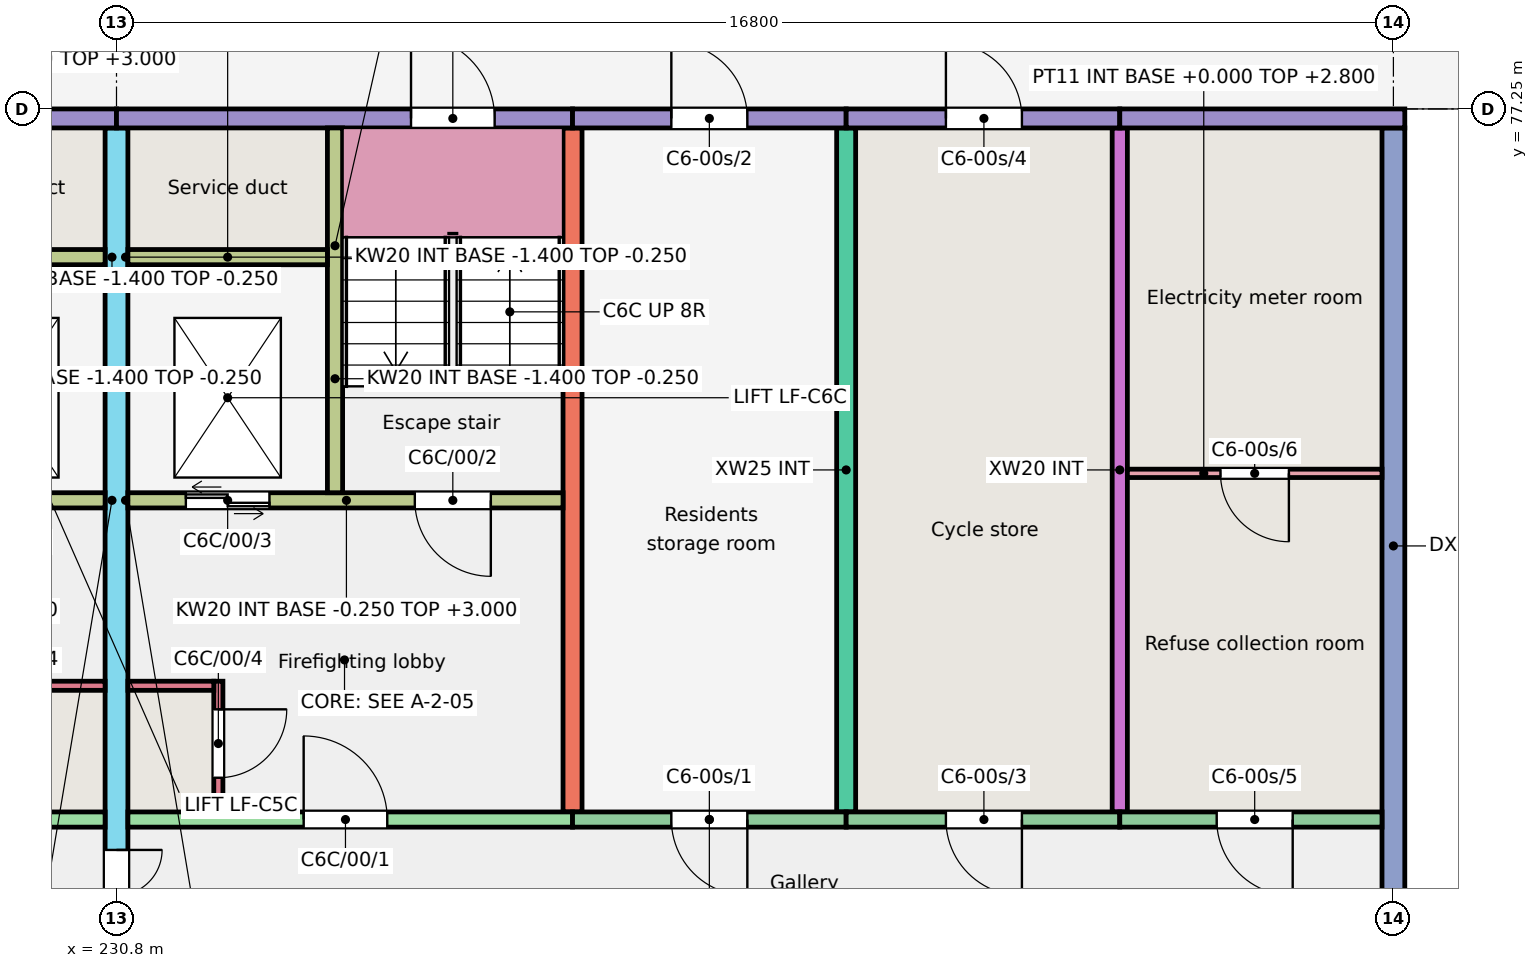
"""IFC4 building model, lengths in metres.
Left out: names, types, materials, properties, quantities, classifications, styles, units other than length and angle.
Written with IfcOpenShell. Run it as: python <this file> out.ifc"""

import sys

from ifc_helpers import new_model, si_unit, direction, frame, frame_2d, origin, place, context, subcontext, project, spatial, rectangle, extrude, element, fill, save


model = new_model("IFC4")
c1 = context("Model", 3, precision=1e-05, world=origin(), true_north=direction((0.0, 1.0)))
c2 = subcontext(c1, "Body", "Model", "MODEL_VIEW")
j1 = project(units=[si_unit("LENGTHUNIT", "METRE"), si_unit("PLANEANGLEUNIT", "RADIAN")], contexts=[c1])
p1 = place(None, origin())
s1 = spatial("IfcSite", under=j1, at=p1, CompositionType="ELEMENT")
p2 = place(p1, origin())
s2 = spatial("IfcBuilding", under=s1, at=p2, CompositionType="ELEMENT")
p3 = place(p2, origin())
s3 = spatial("IfcBuildingStorey", under=s2, at=p3, CompositionType="ELEMENT", Elevation=0.0)
p4 = place(p3, frame((230.8, 66.0, -0.25), z_axis=(0.0, 0.0, 1.0), x_axis=(0.0, 1.0, 0.0)))
e1 = element("IfcWall", 1, at=p4, inside=s3, PredefinedType="SHEAR", context=c2, shape_type="SweptSolid", body=[
    extrude(rectangle(XDim=11.0, YDim=0.3, at=frame_2d((5.5, 0.0))), origin(), (0.0, 0.0, 1.0), 3.25),
])
p5 = place(p4, frame((0.3, 0.0, 0.25)))
e2 = element("IfcOpeningElement", 2, at=p5, cuts=e1, PredefinedType="OPENING", context=c2, shape_type="SweptSolid", body=[
    extrude(rectangle(XDim=1.2, YDim=2.1, at=frame_2d((0.6, 1.05))), frame((0.0, 0.16, 0.0), z_axis=(0.0, -1.0, 0.0), x_axis=(1.0, 0.0, 0.0)), (0.0, 0.0, 1.0), 0.32),
])
for number, where, z_axis, x_axis in (
    (3, (236.8, 68.0, -0.25), (0.0, 0.0, 1.0), (0.0, 1.0, 0.0)),
    (4, (240.4, 68.0, -0.25), (0.0, 0.0, 1.0), (0.0, 1.0, 0.0)),
):
    element("IfcWall", number, at=place(p3, frame(where, z_axis=z_axis, x_axis=x_axis)), inside=s3, PredefinedType="SHEAR", context=c2, shape_type="SweptSolid", body=[
        extrude(rectangle(XDim=9.0, YDim=0.25, at=frame_2d((4.5, 0.0))), origin(), (0.0, 0.0, 1.0), 3.25),
    ])
p6 = place(p3, frame((244.0, 68.0, -0.25), z_axis=(0.0, 0.0, 1.0), x_axis=(0.0, 1.0, 0.0)))
e5 = element("IfcWall", 5, at=p6, inside=s3, PredefinedType="SHEAR", context=c2, shape_type="SweptSolid", body=[
    extrude(rectangle(XDim=9.0, YDim=0.2, at=frame_2d((4.5, 0.0))), origin(), (0.0, 0.0, 1.0), 3.25),
])
p7 = place(p3, frame((247.6, 66.0, -0.25), z_axis=(0.0, 0.0, 1.0), x_axis=(0.0, 1.0, 0.0)))
e6 = element("IfcWall", 6, at=p7, inside=s3, PredefinedType="SHEAR", context=c2, shape_type="SweptSolid", body=[
    extrude(rectangle(XDim=11.0, YDim=0.3, at=frame_2d((5.5, 0.0))), origin(), (0.0, 0.0, 1.0), 3.25),
])
p8 = place(p3, frame((224.8, 77.125, -0.25), z_axis=(0.0, 0.0, 1.0), x_axis=(1.0, 0.0, 0.0)))
e7 = element("IfcWall", 7, at=p8, inside=s3, PredefinedType="SOLIDWALL", context=c2, shape_type="SweptSolid", body=[
    extrude(rectangle(XDim=6.0, YDim=0.25, at=frame_2d((3.0, 0.0))), origin(), (0.0, 0.0, 1.0), 3.25),
])
p9 = place(p8, frame((1.025, 0.0, 0.25)))
e8 = element("IfcOpeningElement", 8, at=p9, cuts=e7, PredefinedType="OPENING", context=c2, shape_type="SweptSolid", body=[
    extrude(rectangle(XDim=1.1, YDim=2.1, at=frame_2d((0.55, 1.05))), frame((0.0, 0.135, 0.0), z_axis=(0.0, -1.0, 0.0), x_axis=(1.0, 0.0, 0.0)), (0.0, 0.0, 1.0), 0.27),
])
p10 = place(p3, frame((224.8, 67.9, -0.25), z_axis=(0.0, 0.0, 1.0), x_axis=(1.0, 0.0, 0.0)))
e9 = element("IfcWall", 9, at=p10, inside=s3, PredefinedType="SHEAR", context=c2, shape_type="SweptSolid", body=[
    extrude(rectangle(XDim=5.85, YDim=0.2, at=frame_2d((2.925, 0.0))), origin(), (0.0, 0.0, 1.0), 3.25),
])
p11 = place(p10, frame((2.438, 0.0, 0.25)))
e10 = element("IfcOpeningElement", 10, at=p11, cuts=e9, PredefinedType="OPENING", context=c2, shape_type="SweptSolid", body=[
    extrude(rectangle(XDim=1.1, YDim=2.1, at=frame_2d((0.55, 1.05))), frame((0.0, 0.11, 0.0), z_axis=(0.0, -1.0, 0.0), x_axis=(1.0, 0.0, 0.0)), (0.0, 0.0, 1.0), 0.22),
])
p12 = place(p3, frame((224.925, 72.1, -0.25), z_axis=(0.0, 0.0, 1.0), x_axis=(1.0, 0.0, 0.0)))
e11 = element("IfcWall", 11, at=p12, inside=s3, PredefinedType="SHEAR", context=c2, shape_type="SweptSolid", body=[
    extrude(rectangle(XDim=5.725, YDim=0.2, at=frame_2d((2.862, 0.0))), origin(), (0.0, 0.0, 1.0), 3.25),
])
p13 = place(p12, frame((0.95, 0.0, 0.25)))
e12 = element("IfcOpeningElement", 12, at=p13, cuts=e11, PredefinedType="OPENING", context=c2, shape_type="SweptSolid", body=[
    extrude(rectangle(XDim=1.0, YDim=2.1, at=frame_2d((0.5, 1.05))), frame((0.0, 0.11, 0.0), z_axis=(0.0, -1.0, 0.0), x_axis=(1.0, 0.0, 0.0)), (0.0, 0.0, 1.0), 0.22),
])
p14 = place(p12, frame((3.863, 0.0, 0.25)))
e13 = element("IfcOpeningElement", 13, at=p14, cuts=e11, PredefinedType="OPENING", context=c2, shape_type="SweptSolid", body=[
    extrude(rectangle(XDim=1.1, YDim=2.1, at=frame_2d((0.55, 1.05))), frame((0.0, 0.11, 0.0), z_axis=(0.0, -1.0, 0.0), x_axis=(1.0, 0.0, 0.0)), (0.0, 0.0, 1.0), 0.22),
])
p15 = place(p3, frame((228.025, 75.3, -0.25), z_axis=(0.0, 0.0, 1.0), x_axis=(1.0, 0.0, 0.0)))
e14 = element("IfcWall", 14, at=p15, inside=s3, PredefinedType="SHEAR", context=c2, shape_type="SweptSolid", body=[
    extrude(rectangle(XDim=2.625, YDim=0.2, at=frame_2d((1.312, 0.0))), origin(), (0.0, 0.0, 1.0), 3.25),
])
p16 = place(p3, frame((229.52, 69.66, -0.25), z_axis=(0.0, 0.0, 1.0), x_axis=(1.0, 0.0, 0.0)))
e15 = element("IfcWall", 15, at=p16, inside=s3, PredefinedType="SHEAR", context=c2, shape_type="SweptSolid", body=[
    extrude(rectangle(XDim=1.13, YDim=0.12, at=frame_2d((0.565, 0.0))), origin(), (0.0, 0.0, 1.0), 3.25),
])
p17 = place(p3, frame((230.8, 77.125, -0.25), z_axis=(0.0, 0.0, 1.0), x_axis=(1.0, 0.0, 0.0)))
e16 = element("IfcWall", 16, at=p17, inside=s3, PredefinedType="SOLIDWALL", context=c2, shape_type="SweptSolid", body=[
    extrude(rectangle(XDim=6.0, YDim=0.25, at=frame_2d((3.0, 0.0))), origin(), (0.0, 0.0, 1.0), 3.25),
])
p18 = place(p17, frame((3.875, 0.0, 0.25)))
e17 = element("IfcOpeningElement", 17, at=p18, cuts=e16, PredefinedType="OPENING", context=c2, shape_type="SweptSolid", body=[
    extrude(rectangle(XDim=1.1, YDim=2.1, at=frame_2d((0.55, 1.05))), frame((0.0, 0.135, 0.0), z_axis=(0.0, -1.0, 0.0), x_axis=(1.0, 0.0, 0.0)), (0.0, 0.0, 1.0), 0.27),
])
p19 = place(p3, frame((230.95, 67.9, -0.25), z_axis=(0.0, 0.0, 1.0), x_axis=(1.0, 0.0, 0.0)))
e18 = element("IfcWall", 18, at=p19, inside=s3, PredefinedType="SHEAR", context=c2, shape_type="SweptSolid", body=[
    extrude(rectangle(XDim=5.85, YDim=0.2, at=frame_2d((2.925, 0.0))), origin(), (0.0, 0.0, 1.0), 3.25),
])
p20 = place(p19, frame((2.312, 0.0, 0.25)))
e19 = element("IfcOpeningElement", 19, at=p20, cuts=e18, PredefinedType="OPENING", context=c2, shape_type="SweptSolid", body=[
    extrude(rectangle(XDim=1.1, YDim=2.1, at=frame_2d((0.55, 1.05))), frame((0.0, 0.11, 0.0), z_axis=(0.0, -1.0, 0.0), x_axis=(1.0, 0.0, 0.0)), (0.0, 0.0, 1.0), 0.22),
])
p21 = place(p3, frame((230.95, 72.1, -0.25), z_axis=(0.0, 0.0, 1.0), x_axis=(1.0, 0.0, 0.0)))
e20 = element("IfcWall", 20, at=p21, inside=s3, PredefinedType="SHEAR", context=c2, shape_type="SweptSolid", body=[
    extrude(rectangle(XDim=5.725, YDim=0.2, at=frame_2d((2.863, 0.0))), origin(), (0.0, 0.0, 1.0), 3.25),
])
p22 = place(p21, frame((3.775, 0.0, 0.25)))
e21 = element("IfcOpeningElement", 21, at=p22, cuts=e20, PredefinedType="OPENING", context=c2, shape_type="SweptSolid", body=[
    extrude(rectangle(XDim=1.0, YDim=2.1, at=frame_2d((0.5, 1.05))), frame((0.0, 0.11, 0.0), z_axis=(0.0, -1.0, 0.0), x_axis=(1.0, 0.0, 0.0)), (0.0, 0.0, 1.0), 0.22),
])
p23 = place(p21, frame((0.762, 0.0, 0.25)))
e22 = element("IfcOpeningElement", 22, at=p23, cuts=e20, PredefinedType="OPENING", context=c2, shape_type="SweptSolid", body=[
    extrude(rectangle(XDim=1.1, YDim=2.1, at=frame_2d((0.55, 1.05))), frame((0.0, 0.11, 0.0), z_axis=(0.0, -1.0, 0.0), x_axis=(1.0, 0.0, 0.0)), (0.0, 0.0, 1.0), 0.22),
])
p24 = place(p3, frame((233.675, 72.2, -0.25), z_axis=(0.0, 0.0, 1.0), x_axis=(0.0, 1.0, 0.0)))
e23 = element("IfcWall", 23, at=p24, inside=s3, PredefinedType="SHEAR", context=c2, shape_type="SweptSolid", body=[
    extrude(rectangle(XDim=4.8, YDim=0.2, at=frame_2d((2.4, 0.0))), origin(), (0.0, 0.0, 1.0), 3.25),
])
p25 = place(p3, frame((230.95, 75.3, -0.25), z_axis=(0.0, 0.0, 1.0), x_axis=(1.0, 0.0, 0.0)))
e24 = element("IfcWall", 24, at=p25, inside=s3, PredefinedType="SHEAR", context=c2, shape_type="SweptSolid", body=[
    extrude(rectangle(XDim=2.625, YDim=0.2, at=frame_2d((1.312, 0.0))), origin(), (0.0, 0.0, 1.0), 3.25),
])
p26 = place(p3, frame((232.14, 68.0, -0.25), z_axis=(0.0, 0.0, 1.0), x_axis=(0.0, 1.0, 0.0)))
e25 = element("IfcWall", 25, at=p26, inside=s3, PredefinedType="SHEAR", context=c2, shape_type="SweptSolid", body=[
    extrude(rectangle(XDim=1.72, YDim=0.12, at=frame_2d((0.86, 0.0))), origin(), (0.0, 0.0, 1.0), 3.25),
])
p27 = place(p26, frame((0.45, 0.0, 0.25)))
e26 = element("IfcOpeningElement", 26, at=p27, cuts=e25, PredefinedType="OPENING", context=c2, shape_type="SweptSolid", body=[
    extrude(rectangle(XDim=0.9, YDim=2.1, at=frame_2d((0.45, 1.05))), frame((0.0, 0.07, 0.0), z_axis=(0.0, -1.0, 0.0), x_axis=(1.0, 0.0, 0.0)), (0.0, 0.0, 1.0), 0.14),
])
p28 = place(p3, frame((230.95, 69.66, -0.25), z_axis=(0.0, 0.0, 1.0), x_axis=(1.0, 0.0, 0.0)))
e27 = element("IfcWall", 27, at=p28, inside=s3, PredefinedType="SHEAR", context=c2, shape_type="SweptSolid", body=[
    extrude(rectangle(XDim=1.13, YDim=0.12, at=frame_2d((0.565, 0.0))), origin(), (0.0, 0.0, 1.0), 3.25),
])
p29 = place(p3, frame((236.8, 77.125, -0.25), z_axis=(0.0, 0.0, 1.0), x_axis=(1.0, 0.0, 0.0)))
e28 = element("IfcWall", 28, at=p29, inside=s3, PredefinedType="SOLIDWALL", context=c2, shape_type="SweptSolid", body=[
    extrude(rectangle(XDim=3.6, YDim=0.25, at=frame_2d((1.8, 0.0))), origin(), (0.0, 0.0, 1.0), 3.25),
])
p30 = place(p29, frame((1.3, 0.0, 0.25)))
e29 = element("IfcOpeningElement", 29, at=p30, cuts=e28, PredefinedType="OPENING", context=c2, shape_type="SweptSolid", body=[
    extrude(rectangle(XDim=1.0, YDim=2.1, at=frame_2d((0.5, 1.05))), frame((0.0, 0.135, 0.0), z_axis=(0.0, -1.0, 0.0), x_axis=(1.0, 0.0, 0.0)), (0.0, 0.0, 1.0), 0.27),
])
p31 = place(p3, frame((236.8, 67.9, -0.25), z_axis=(0.0, 0.0, 1.0), x_axis=(1.0, 0.0, 0.0)))
e30 = element("IfcWall", 30, at=p31, inside=s3, PredefinedType="SOLIDWALL", context=c2, shape_type="SweptSolid", body=[
    extrude(rectangle(XDim=3.6, YDim=0.2, at=frame_2d((1.8, 0.0))), origin(), (0.0, 0.0, 1.0), 3.25),
])
p32 = place(p31, frame((1.3, 0.0, 0.25)))
e31 = element("IfcOpeningElement", 31, at=p32, cuts=e30, PredefinedType="OPENING", context=c2, shape_type="SweptSolid", body=[
    extrude(rectangle(XDim=1.0, YDim=2.1, at=frame_2d((0.5, 1.05))), frame((0.0, 0.11, 0.0), z_axis=(0.0, -1.0, 0.0), x_axis=(1.0, 0.0, 0.0)), (0.0, 0.0, 1.0), 0.22),
])
p33 = place(p3, frame((240.4, 77.125, -0.25), z_axis=(0.0, 0.0, 1.0), x_axis=(1.0, 0.0, 0.0)))
e32 = element("IfcWall", 32, at=p33, inside=s3, PredefinedType="SOLIDWALL", context=c2, shape_type="SweptSolid", body=[
    extrude(rectangle(XDim=3.6, YDim=0.25, at=frame_2d((1.8, 0.0))), origin(), (0.0, 0.0, 1.0), 3.25),
])
p34 = place(p33, frame((1.312, 0.0, 0.25)))
e33 = element("IfcOpeningElement", 33, at=p34, cuts=e32, PredefinedType="OPENING", context=c2, shape_type="SweptSolid", body=[
    extrude(rectangle(XDim=1.0, YDim=2.1, at=frame_2d((0.5, 1.05))), frame((0.0, 0.135, 0.0), z_axis=(0.0, -1.0, 0.0), x_axis=(1.0, 0.0, 0.0)), (0.0, 0.0, 1.0), 0.27),
])
p35 = place(p3, frame((240.4, 67.9, -0.25), z_axis=(0.0, 0.0, 1.0), x_axis=(1.0, 0.0, 0.0)))
e34 = element("IfcWall", 34, at=p35, inside=s3, PredefinedType="SOLIDWALL", context=c2, shape_type="SweptSolid", body=[
    extrude(rectangle(XDim=3.6, YDim=0.2, at=frame_2d((1.8, 0.0))), origin(), (0.0, 0.0, 1.0), 3.25),
])
p36 = place(p35, frame((1.312, 0.0, 0.25)))
e35 = element("IfcOpeningElement", 35, at=p36, cuts=e34, PredefinedType="OPENING", context=c2, shape_type="SweptSolid", body=[
    extrude(rectangle(XDim=1.0, YDim=2.1, at=frame_2d((0.5, 1.05))), frame((0.0, 0.11, 0.0), z_axis=(0.0, -1.0, 0.0), x_axis=(1.0, 0.0, 0.0)), (0.0, 0.0, 1.0), 0.22),
])
p37 = place(p3, frame((244.0, 77.125, -0.25), z_axis=(0.0, 0.0, 1.0), x_axis=(1.0, 0.0, 0.0)))
e36 = element("IfcWall", 36, at=p37, inside=s3, PredefinedType="SOLIDWALL", context=c2, shape_type="SweptSolid", body=[
    extrude(rectangle(XDim=3.75, YDim=0.25, at=frame_2d((1.875, 0.0))), origin(), (0.0, 0.0, 1.0), 3.25),
])
p38 = place(p3, frame((244.0, 67.9, -0.25), z_axis=(0.0, 0.0, 1.0), x_axis=(1.0, 0.0, 0.0)))
e37 = element("IfcWall", 37, at=p38, inside=s3, PredefinedType="SOLIDWALL", context=c2, shape_type="SweptSolid", body=[
    extrude(rectangle(XDim=3.45, YDim=0.2, at=frame_2d((1.725, 0.0))), origin(), (0.0, 0.0, 1.0), 3.25),
])
p39 = place(p38, frame((1.275, 0.0, 0.25)))
e38 = element("IfcOpeningElement", 38, at=p39, cuts=e37, PredefinedType="OPENING", context=c2, shape_type="SweptSolid", body=[
    extrude(rectangle(XDim=1.0, YDim=2.1, at=frame_2d((0.5, 1.05))), frame((0.0, 0.11, 0.0), z_axis=(0.0, -1.0, 0.0), x_axis=(1.0, 0.0, 0.0)), (0.0, 0.0, 1.0), 0.22),
])
for number, where, z_axis, x_axis in (
    (39, (227.825, 72.1, -1.4), (0.0, 0.0, 1.0), (1.0, 0.0, 0.0)),
    (40, (227.825, 75.3, -1.4), (0.0, 0.0, 1.0), (1.0, 0.0, 0.0)),
):
    element("IfcWall", number, at=place(p3, frame(where, z_axis=z_axis, x_axis=x_axis)), inside=s3, PredefinedType="SHEAR", context=c2, shape_type="SweptSolid", body=[
        extrude(rectangle(XDim=2.975, YDim=0.2, at=frame_2d((1.488, 0.0))), origin(), (0.0, 0.0, 1.0), 1.15),
    ])
p40 = place(p3, frame((230.725, 72.2, -1.4), z_axis=(0.0, 0.0, 1.0), x_axis=(0.0, 1.0, 0.0)))
e41 = element("IfcWall", 41, at=p40, inside=s3, PredefinedType="SHEAR", context=c2, shape_type="SweptSolid", body=[
    extrude(rectangle(XDim=3.0, YDim=0.15, at=frame_2d((1.5, 0.0))), origin(), (0.0, 0.0, 1.0), 1.15),
])
for number, where, z_axis, x_axis in (
    (42, (230.8, 72.1, -1.4), (0.0, 0.0, 1.0), (1.0, 0.0, 0.0)),
    (43, (230.8, 75.3, -1.4), (0.0, 0.0, 1.0), (1.0, 0.0, 0.0)),
):
    element("IfcWall", number, at=place(p3, frame(where, z_axis=z_axis, x_axis=x_axis)), inside=s3, PredefinedType="SHEAR", context=c2, shape_type="SweptSolid", body=[
        extrude(rectangle(XDim=2.975, YDim=0.2, at=frame_2d((1.487, 0.0))), origin(), (0.0, 0.0, 1.0), 1.15),
    ])
p41 = place(p3, frame((233.675, 72.2, -1.4), z_axis=(0.0, 0.0, 1.0), x_axis=(0.0, 1.0, 0.0)))
e44 = element("IfcWall", 44, at=p41, inside=s3, PredefinedType="SHEAR", context=c2, shape_type="SweptSolid", body=[
    extrude(rectangle(XDim=3.0, YDim=0.2, at=frame_2d((1.5, 0.0))), origin(), (0.0, 0.0, 1.0), 1.15),
])
p42 = place(p3, frame((230.875, 72.2, -1.4), z_axis=(0.0, 0.0, 1.0), x_axis=(0.0, 1.0, 0.0)))
e45 = element("IfcWall", 45, at=p42, inside=s3, PredefinedType="SHEAR", context=c2, shape_type="SweptSolid", body=[
    extrude(rectangle(XDim=3.0, YDim=0.15, at=frame_2d((1.5, 0.0))), origin(), (0.0, 0.0, 1.0), 1.15),
])
p43 = place(p3, frame((244.1, 72.455, 0.0), z_axis=(0.0, 0.0, 1.0), x_axis=(1.0, 0.0, 0.0)))
e46 = element("IfcWall", 46, at=p43, inside=s3, PredefinedType="PARTITIONING", context=c2, shape_type="SweptSolid", body=[
    extrude(rectangle(XDim=3.35, YDim=0.11, at=frame_2d((1.675, 0.0))), origin(), (0.0, 0.0, 1.0), 2.8),
])
p44 = place(p43, frame((1.225, 0.0, 0.0)))
e47 = element("IfcOpeningElement", 47, at=p44, cuts=e46, PredefinedType="OPENING", context=c2, shape_type="SweptSolid", body=[
    extrude(rectangle(XDim=0.9, YDim=2.1, at=frame_2d((0.45, 1.05))), frame((0.0, 0.065, 0.0), z_axis=(0.0, -1.0, 0.0), x_axis=(1.0, 0.0, 0.0)), (0.0, 0.0, 1.0), 0.13),
])
p45 = place(p32, origin())
e48 = element("IfcDoor", 48, at=p45, inside=s3, OperationType="SINGLE_SWING_RIGHT", PredefinedType="DOOR", context=c2, shape_type="SweptSolid", body=[
    extrude(rectangle(XDim=1.0, YDim=2.1, at=frame_2d((0.5, 1.05))), frame((0.0, 0.025, 0.0), z_axis=(0.0, -1.0, 0.0), x_axis=(1.0, 0.0, 0.0)), (0.0, 0.0, 1.0), 0.05),
])
fill(e31, e48)
p46 = place(p30, origin())
e49 = element("IfcDoor", 49, at=p46, inside=s3, OperationType="SINGLE_SWING_LEFT", PredefinedType="DOOR", context=c2, shape_type="SweptSolid", body=[
    extrude(rectangle(XDim=1.0, YDim=2.1, at=frame_2d((0.5, 1.05))), frame((0.0, 0.025, 0.0), z_axis=(0.0, -1.0, 0.0), x_axis=(1.0, 0.0, 0.0)), (0.0, 0.0, 1.0), 0.05),
])
fill(e29, e49)
p47 = place(p36, origin())
e50 = element("IfcDoor", 50, at=p47, inside=s3, OperationType="SINGLE_SWING_RIGHT", PredefinedType="DOOR", context=c2, shape_type="SweptSolid", body=[
    extrude(rectangle(XDim=1.0, YDim=2.1, at=frame_2d((0.5, 1.05))), frame((0.0, 0.025, 0.0), z_axis=(0.0, -1.0, 0.0), x_axis=(1.0, 0.0, 0.0)), (0.0, 0.0, 1.0), 0.05),
])
fill(e35, e50)
p48 = place(p34, origin())
e51 = element("IfcDoor", 51, at=p48, inside=s3, OperationType="SINGLE_SWING_LEFT", PredefinedType="DOOR", context=c2, shape_type="SweptSolid", body=[
    extrude(rectangle(XDim=1.0, YDim=2.1, at=frame_2d((0.5, 1.05))), frame((0.0, 0.025, 0.0), z_axis=(0.0, -1.0, 0.0), x_axis=(1.0, 0.0, 0.0)), (0.0, 0.0, 1.0), 0.05),
])
fill(e33, e51)
p49 = place(p39, origin())
e52 = element("IfcDoor", 52, at=p49, inside=s3, OperationType="SINGLE_SWING_RIGHT", PredefinedType="DOOR", context=c2, shape_type="SweptSolid", body=[
    extrude(rectangle(XDim=1.0, YDim=2.1, at=frame_2d((0.5, 1.05))), frame((0.0, 0.025, 0.0), z_axis=(0.0, -1.0, 0.0), x_axis=(1.0, 0.0, 0.0)), (0.0, 0.0, 1.0), 0.05),
])
fill(e38, e52)
p50 = place(p44, origin())
e53 = element("IfcDoor", 53, at=p50, inside=s3, OperationType="SINGLE_SWING_RIGHT", PredefinedType="DOOR", context=c2, shape_type="SweptSolid", body=[
    extrude(rectangle(XDim=0.9, YDim=2.1, at=frame_2d((0.45, 1.05))), frame((0.0, 0.025, 0.0), z_axis=(0.0, -1.0, 0.0), x_axis=(1.0, 0.0, 0.0)), (0.0, 0.0, 1.0), 0.05),
])
fill(e47, e53)
p51 = place(p20, origin())
e54 = element("IfcDoor", 54, at=p51, inside=s3, OperationType="SINGLE_SWING_LEFT", PredefinedType="DOOR", context=c2, shape_type="SweptSolid", body=[
    extrude(rectangle(XDim=1.1, YDim=2.1, at=frame_2d((0.55, 1.05))), frame((0.0, 0.025, 0.0), z_axis=(0.0, -1.0, 0.0), x_axis=(1.0, 0.0, 0.0)), (0.0, 0.0, 1.0), 0.05),
])
fill(e19, e54)
p52 = place(p22, origin())
e55 = element("IfcDoor", 55, at=p52, inside=s3, OperationType="SINGLE_SWING_RIGHT", PredefinedType="DOOR", context=c2, shape_type="SweptSolid", body=[
    extrude(rectangle(XDim=1.0, YDim=2.1, at=frame_2d((0.5, 1.05))), frame((0.0, 0.025, 0.0), z_axis=(0.0, -1.0, 0.0), x_axis=(1.0, 0.0, 0.0)), (0.0, 0.0, 1.0), 0.05),
])
fill(e21, e55)
p53 = place(p23, origin())
e56 = element("IfcDoor", 56, at=p53, inside=s3, OperationType="DOUBLE_DOOR_SLIDING", PredefinedType="DOOR", context=c2, shape_type="SweptSolid", body=[
    extrude(rectangle(XDim=1.1, YDim=2.1, at=frame_2d((0.55, 1.05))), frame((0.0, 0.025, 0.0), z_axis=(0.0, -1.0, 0.0), x_axis=(1.0, 0.0, 0.0)), (0.0, 0.0, 1.0), 0.05),
])
fill(e22, e56)
p54 = place(p27, origin())
e57 = element("IfcDoor", 57, at=p54, inside=s3, OperationType="SINGLE_SWING_RIGHT", PredefinedType="DOOR", context=c2, shape_type="SweptSolid", body=[
    extrude(rectangle(XDim=0.9, YDim=2.1, at=frame_2d((0.45, 1.05))), frame((0.0, 0.025, 0.0), z_axis=(0.0, -1.0, 0.0), x_axis=(1.0, 0.0, 0.0)), (0.0, 0.0, 1.0), 0.05),
])
fill(e26, e57)
p55 = place(p18, origin())
e58 = element("IfcDoor", 58, at=p55, inside=s3, OperationType="SINGLE_SWING_LEFT", PredefinedType="DOOR", context=c2, shape_type="SweptSolid", body=[
    extrude(rectangle(XDim=1.1, YDim=2.1, at=frame_2d((0.55, 1.05))), frame((0.0, 0.025, 0.0), z_axis=(0.0, -1.0, 0.0), x_axis=(1.0, 0.0, 0.0)), (0.0, 0.0, 1.0), 0.05),
])
fill(e17, e58)
p56 = place(p5, origin())
e59 = element("IfcDoor", 59, at=p56, inside=s3, OperationType="DOUBLE_DOOR_SINGLE_SWING", PredefinedType="DOOR", context=c2, shape_type="SweptSolid", body=[
    extrude(rectangle(XDim=1.2, YDim=2.1, at=frame_2d((0.6, 1.05))), frame((0.0, 0.025, 0.0), z_axis=(0.0, -1.0, 0.0), x_axis=(1.0, 0.0, 0.0)), (0.0, 0.0, 1.0), 0.05),
])
fill(e2, e59)
save(model, sys.argv[1])
